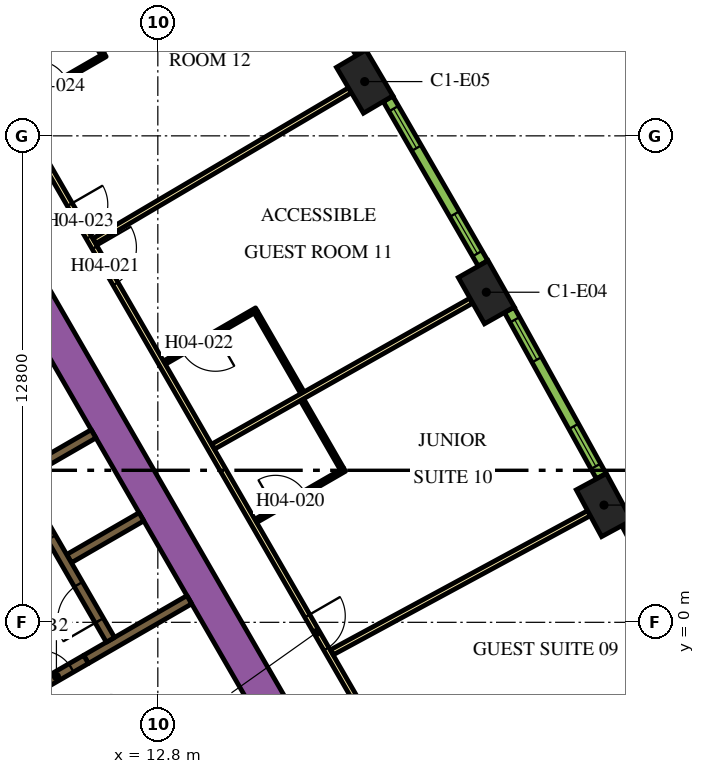
"""IFC4 building model, lengths in metres.
Left out: names, types, materials, properties, quantities, classifications, styles, units other than length and angle.
Written with IfcOpenShell. Run it as: python <this file> out.ifc"""

import sys

from ifc_helpers import new_model, si_unit, direction, frame, frame_2d, origin, origin_2d, place, context, subcontext, project, spatial, rectangle, extrude, element, fill, save


model = new_model("IFC4")
c1 = context("Model", 3, precision=1e-05, world=origin(), true_north=direction((0.0, 1.0)))
c2 = subcontext(c1, "Body", "Model", "MODEL_VIEW")
j1 = project(units=[si_unit("LENGTHUNIT", "METRE"), si_unit("PLANEANGLEUNIT", "RADIAN")], contexts=[c1])
p1 = place(None, origin())
s1 = spatial("IfcSite", under=j1, at=p1, CompositionType="ELEMENT")
p2 = place(p1, origin())
s2 = spatial("IfcBuilding", under=s1, at=p2, CompositionType="ELEMENT")
p3 = place(p2, frame((0.0, 0.0, 62.7)))
s3 = spatial("IfcBuildingStorey", under=s2, at=p3, CompositionType="ELEMENT", Elevation=62.7)
for number, where, z_axis, x_axis in (
    (1, (24.54, 3.085, 0.0), (0.0, 0.0, 1.0), (-0.476, 0.88, 0.0)),
    (2, (21.443, 8.685, 0.0), (0.0, 0.0, 1.0), (-0.492, 0.871, 0.0)),
    (3, (18.243, 14.228, 0.0), (0.0, 0.0, 1.0), (-0.508, 0.861, 0.0)),
):
    element("IfcColumn", number, at=place(p3, frame(where, z_axis=z_axis, x_axis=x_axis)), inside=s3, PredefinedType="COLUMN", context=c2, shape_type="SweptSolid", body=[
        extrude(rectangle(XDim=1.4, YDim=0.9, at=origin_2d()), origin(), (0.0, 0.0, 1.0), 3.9),
    ])
p4 = place(p3, frame((6.776, 13.364, 0.0), z_axis=(0.0, 0.0, 1.0), x_axis=(0.500004177138, -0.8660229921, 0.0)))
e4 = element("IfcWall", 4, at=p4, inside=s3, PredefinedType="SOLIDWALL", context=c2, shape_type="SweptSolid", body=[
    extrude(rectangle(XDim=20.204, YDim=0.9, at=frame_2d((10.102, 0.0))), origin(), (0.0, 0.0, 1.0), 3.9),
])
for number, where, z_axis, x_axis in (
    (5, (10.464, 1.677, 0.0), (0.0, 0.0, 1.0), (0.866, 0.5, 0.0)),
    (6, (9.204, 3.859, 0.0), (0.0, 0.0, 1.0), (0.866, 0.5, 0.0)),
):
    element("IfcWall", number, at=place(p3, frame(where, z_axis=z_axis, x_axis=x_axis)), inside=s3, PredefinedType="SOLIDWALL", context=c2, shape_type="SweptSolid", body=[
        extrude(rectangle(XDim=2.2, YDim=0.25, at=frame_2d((1.1, 0.0))), origin(), (0.0, 0.0, 1.0), 3.9),
    ])
p5 = place(p3, frame((10.911, -0.975, 0.0), z_axis=(0.0, 0.0, 1.0), x_axis=(0.866046979468, 0.499962627957, 0.0)))
e7 = element("IfcWall", 7, at=p5, inside=s3, PredefinedType="SOLIDWALL", context=c2, shape_type="SweptSolid", body=[
    extrude(rectangle(XDim=3.138, YDim=0.25, at=frame_2d((1.569, 0.0))), origin(), (0.0, 0.0, 1.0), 3.9),
])
p6 = place(p3, frame((11.553, -0.46, 0.0), z_axis=(0.0, 0.0, 1.0), x_axis=(-0.500006514828, 0.866021642414, 0.0)))
e8 = element("IfcWall", 8, at=p6, inside=s3, PredefinedType="SOLIDWALL", context=c2, shape_type="SweptSolid", body=[
    extrude(rectangle(XDim=12.35, YDim=0.25, at=frame_2d((6.175, 0.0))), origin(), (0.0, 0.0, 1.0), 3.9),
])
p7 = place(p6, frame((0.585, 0.0, 0.0)))
e9 = element("IfcOpeningElement", 9, at=p7, cuts=e8, PredefinedType="OPENING", context=c2, shape_type="SweptSolid", body=[
    extrude(rectangle(XDim=1.1, YDim=2.1, at=frame_2d((0.55, 1.05))), frame((0.0, 0.135, 0.0), z_axis=(0.0, -1.0, 0.0), x_axis=(1.0, 0.0, 0.0)), (0.0, 0.0, 1.0), 0.27),
])
p8 = place(p6, frame((3.105, 0.0, 0.0)))
e10 = element("IfcOpeningElement", 10, at=p8, cuts=e8, PredefinedType="OPENING", context=c2, shape_type="SweptSolid", body=[
    extrude(rectangle(XDim=1.1, YDim=2.1, at=frame_2d((0.55, 1.05))), frame((0.0, 0.135, 0.0), z_axis=(0.0, -1.0, 0.0), x_axis=(1.0, 0.0, 0.0)), (0.0, 0.0, 1.0), 0.27),
])
p9 = place(p6, frame((5.625, 0.0, 0.0)))
e11 = element("IfcOpeningElement", 11, at=p9, cuts=e8, PredefinedType="OPENING", context=c2, shape_type="SweptSolid", body=[
    extrude(rectangle(XDim=1.1, YDim=2.1, at=frame_2d((0.55, 1.05))), frame((0.0, 0.135, 0.0), z_axis=(0.0, -1.0, 0.0), x_axis=(1.0, 0.0, 0.0)), (0.0, 0.0, 1.0), 0.27),
])
p10 = place(p3, frame((9.352, -1.875, 0.0), z_axis=(0.0, 0.0, 1.0), x_axis=(0.865989075817, 0.500062916607, 0.0)))
e12 = element("IfcWall", 12, at=p10, inside=s3, PredefinedType="SOLIDWALL", context=c2, shape_type="SweptSolid", body=[
    extrude(rectangle(XDim=1.8, YDim=0.25, at=frame_2d((0.9, 0.0))), origin(), (0.0, 0.0, 1.0), 3.9),
])
p11 = place(p10, frame((0.45, 0.0, 0.0)))
e13 = element("IfcOpeningElement", 13, at=p11, cuts=e12, PredefinedType="OPENING", context=c2, shape_type="SweptSolid", body=[
    extrude(rectangle(XDim=0.9, YDim=2.1, at=frame_2d((0.45, 1.05))), frame((0.0, 0.135, 0.0), z_axis=(0.0, -1.0, 0.0), x_axis=(1.0, 0.0, 0.0)), (0.0, 0.0, 1.0), 0.27),
])
p12 = place(p3, frame((6.163, 18.475, 0.0), z_axis=(0.0, 0.0, 1.0), x_axis=(0.500001317485, -0.866024643133, 0.0)))
e14 = element("IfcWall", 14, at=p12, inside=s3, PredefinedType="PARTITIONING", context=c2, shape_type="SweptSolid", body=[
    extrude(rectangle(XDim=25.767, YDim=0.15, at=frame_2d((12.883, 0.0))), origin(), (0.0, 0.0, 1.0), 2.75),
])
p13 = place(p12, frame((21.138, 0.0, 0.0)))
e15 = element("IfcOpeningElement", 15, at=p13, cuts=e14, PredefinedType="OPENING", context=c2, shape_type="SweptSolid", body=[
    extrude(rectangle(XDim=1.0, YDim=2.1, at=frame_2d((0.5, 1.05))), frame((0.0, 0.085, 0.0), z_axis=(0.0, -1.0, 0.0), x_axis=(1.0, 0.0, 0.0)), (0.0, 0.0, 1.0), 0.17),
])
p14 = place(p12, frame((9.948, 0.0, 0.0)))
e16 = element("IfcOpeningElement", 16, at=p14, cuts=e14, PredefinedType="OPENING", context=c2, shape_type="SweptSolid", body=[
    extrude(rectangle(XDim=1.1, YDim=2.1, at=frame_2d((0.55, 1.05))), frame((0.0, 0.085, 0.0), z_axis=(0.0, -1.0, 0.0), x_axis=(1.0, 0.0, 0.0)), (0.0, 0.0, 1.0), 0.17),
])
p15 = place(p12, frame((8.641, 0.0, 0.0)))
e17 = element("IfcOpeningElement", 17, at=p15, cuts=e14, PredefinedType="OPENING", context=c2, shape_type="SweptSolid", body=[
    extrude(rectangle(XDim=1.0, YDim=2.1, at=frame_2d((0.5, 1.05))), frame((0.0, 0.085, 0.0), z_axis=(0.0, -1.0, 0.0), x_axis=(1.0, 0.0, 0.0)), (0.0, 0.0, 1.0), 0.17),
])
p16 = place(p12, frame((0.18, 0.0, 0.0)))
e18 = element("IfcOpeningElement", 18, at=p16, cuts=e14, PredefinedType="OPENING", context=c2, shape_type="SweptSolid", body=[
    extrude(rectangle(XDim=1.0, YDim=2.1, at=frame_2d((0.5, 1.05))), frame((0.0, 0.085, 0.0), z_axis=(0.0, -1.0, 0.0), x_axis=(1.0, 0.0, 0.0)), (0.0, 0.0, 1.0), 0.17),
])
p17 = place(p3, frame((17.856, 13.999, 0.0), z_axis=(0.0, 0.0, 1.0), x_axis=(-0.861371519381, -0.507975497047, 0.0)))
e19 = element("IfcWall", 19, at=p17, inside=s3, PredefinedType="PARTITIONING", context=c2, shape_type="SweptSolid", body=[
    extrude(rectangle(XDim=7.804, YDim=0.15, at=frame_2d((3.902, 0.0))), origin(), (0.0, 0.0, 1.0), 2.75),
])
p18 = place(p3, frame((21.052, 8.464, 0.0), z_axis=(0.0, 0.0, 1.0), x_axis=(-0.87059371954, -0.492002617368, 0.0)))
e20 = element("IfcWall", 20, at=p18, inside=s3, PredefinedType="PARTITIONING", context=c2, shape_type="SweptSolid", body=[
    extrude(rectangle(XDim=7.803, YDim=0.15, at=frame_2d((3.902, 0.0))), origin(), (0.0, 0.0, 1.0), 2.75),
])
p19 = place(p3, frame((24.145, 2.871, 0.0), z_axis=(0.0, 0.0, 1.0), x_axis=(-0.879551725039, -0.475803281809, 0.0)))
e21 = element("IfcWall", 21, at=p19, inside=s3, PredefinedType="PARTITIONING", context=c2, shape_type="SweptSolid", body=[
    extrude(rectangle(XDim=7.688, YDim=0.15, at=frame_2d((3.844, 0.0))), origin(), (0.0, 0.0, 1.0), 2.75),
])
p20 = place(p3, frame((15.376, 2.668, 0.0), z_axis=(0.0, 0.0, 1.0), x_axis=(0.866036505625, 0.499980770555, 0.0)))
e22 = element("IfcWall", 22, at=p20, inside=s3, PredefinedType="PARTITIONING", context=c2, shape_type="SweptSolid", body=[
    extrude(rectangle(XDim=2.7, YDim=0.1, at=frame_2d((1.35, 0.0))), origin(), (0.0, 0.0, 1.0), 2.75),
])
p21 = place(p20, frame((0.6, 0.0, 0.0)))
e23 = element("IfcOpeningElement", 23, at=p21, cuts=e22, PredefinedType="OPENING", context=c2, shape_type="SweptSolid", body=[
    extrude(rectangle(XDim=0.9, YDim=2.1, at=frame_2d((0.45, 1.05))), frame((0.0, 0.06, 0.0), z_axis=(0.0, -1.0, 0.0), x_axis=(1.0, 0.0, 0.0)), (0.0, 0.0, 1.0), 0.12),
])
p22 = place(p3, frame((17.646, 4.036, 0.0), z_axis=(0.0, 0.0, 1.0), x_axis=(-0.500027713859, 0.866009402589, 0.0)))
e24 = element("IfcWall", 24, at=p22, inside=s3, PredefinedType="PARTITIONING", context=c2, shape_type="SweptSolid", body=[
    extrude(rectangle(XDim=2.1, YDim=0.1, at=frame_2d((1.05, 0.0))), origin(), (0.0, 0.0, 1.0), 2.75),
])
p23 = place(p3, frame((15.397, 8.231, 0.0), z_axis=(0.0, 0.0, 1.0), x_axis=(-0.866018616679, -0.500011755427, 0.0)))
e25 = element("IfcWall", 25, at=p23, inside=s3, PredefinedType="PARTITIONING", context=c2, shape_type="SweptSolid", body=[
    extrude(rectangle(XDim=2.8, YDim=0.1, at=frame_2d((1.4, 0.0))), origin(), (0.0, 0.0, 1.0), 2.75),
])
p24 = place(p23, frame((1.25, 0.0, 0.0)))
e26 = element("IfcOpeningElement", 26, at=p24, cuts=e25, PredefinedType="OPENING", context=c2, shape_type="SweptSolid", body=[
    extrude(rectangle(XDim=1.0, YDim=2.1, at=frame_2d((0.5, 1.05))), frame((0.0, 0.06, 0.0), z_axis=(0.0, -1.0, 0.0), x_axis=(1.0, 0.0, 0.0)), (0.0, 0.0, 1.0), 0.12),
])
p25 = place(p3, frame((15.379, 8.163, 0.0), z_axis=(0.0, 0.0, 1.0), x_axis=(0.499987006516, -0.866032905446, 0.0)))
e27 = element("IfcWall", 27, at=p25, inside=s3, PredefinedType="PARTITIONING", context=c2, shape_type="SweptSolid", body=[
    extrude(rectangle(XDim=2.45, YDim=0.1, at=frame_2d((1.225, 0.0))), origin(), (0.0, 0.0, 1.0), 2.75),
])
p26 = place(p3, frame((9.077, 13.578, 0.0), z_axis=(0.0, 0.0, 1.0), x_axis=(0.866036505625, 0.499980770555, 0.0)))
e28 = element("IfcWall", 28, at=p26, inside=s3, PredefinedType="PARTITIONING", context=c2, shape_type="SweptSolid", body=[
    extrude(rectangle(XDim=2.7, YDim=0.1, at=frame_2d((1.35, 0.0))), origin(), (0.0, 0.0, 1.0), 2.75),
])
p27 = place(p26, frame((0.6, 0.0, 0.0)))
e29 = element("IfcOpeningElement", 29, at=p27, cuts=e28, PredefinedType="OPENING", context=c2, shape_type="SweptSolid", body=[
    extrude(rectangle(XDim=0.9, YDim=2.1, at=frame_2d((0.45, 1.05))), frame((0.0, 0.06, 0.0), z_axis=(0.0, -1.0, 0.0), x_axis=(1.0, 0.0, 0.0)), (0.0, 0.0, 1.0), 0.12),
])
p28 = place(p3, frame((11.342, 14.955, 0.0), z_axis=(0.0, 0.0, 1.0), x_axis=(-0.500008976872, 0.866020220923, 0.0)))
e30 = element("IfcWall", 30, at=p28, inside=s3, PredefinedType="PARTITIONING", context=c2, shape_type="SweptSolid", body=[
    extrude(rectangle(XDim=2.09, YDim=0.1, at=frame_2d((1.045, 0.0))), origin(), (0.0, 0.0, 1.0), 2.75),
])
p29 = place(p3, frame((27.475, -1.81, 0.0), z_axis=(0.0, 0.0, 1.0), x_axis=(-0.467629620899, 0.883924509026, 0.0)))
e31 = element("IfcWall", 31, at=p29, inside=s3, PredefinedType="SOLIDWALL", context=c2, shape_type="SweptSolid", body=[
    extrude(rectangle(XDim=4.998, YDim=0.29, at=frame_2d((2.499, 0.0))), origin(), (0.0, 0.0, 1.0), 3.65),
])
p30 = place(p29, frame((0.297, 0.0, 0.9)))
e32 = element("IfcOpeningElement", 32, at=p30, cuts=e31, PredefinedType="OPENING", context=c2, shape_type="SweptSolid", body=[
    extrude(rectangle(XDim=1.2, YDim=2.15, at=frame_2d((0.6, 1.075))), frame((0.0, 0.155, 0.0), z_axis=(0.0, -1.0, 0.0), x_axis=(1.0, 0.0, 0.0)), (0.0, 0.0, 1.0), 0.31),
])
p31 = place(p29, frame((3.501, 0.0, 0.9)))
e33 = element("IfcOpeningElement", 33, at=p31, cuts=e31, PredefinedType="OPENING", context=c2, shape_type="SweptSolid", body=[
    extrude(rectangle(XDim=1.2, YDim=2.15, at=frame_2d((0.6, 1.075))), frame((0.0, 0.155, 0.0), z_axis=(0.0, -1.0, 0.0), x_axis=(1.0, 0.0, 0.0)), (0.0, 0.0, 1.0), 0.31),
])
p32 = place(p3, frame((24.468, 3.846, 0.0), z_axis=(0.0, 0.0, 1.0), x_axis=(-0.483912572871, 0.875116347589, 0.0)))
e34 = element("IfcWall", 34, at=p32, inside=s3, PredefinedType="SOLIDWALL", context=c2, shape_type="SweptSolid", body=[
    extrude(rectangle(XDim=4.998, YDim=0.29, at=frame_2d((2.499, 0.0))), origin(), (0.0, 0.0, 1.0), 3.65),
])
p33 = place(p32, frame((0.297, 0.0, 0.9)))
e35 = element("IfcOpeningElement", 35, at=p33, cuts=e34, PredefinedType="OPENING", context=c2, shape_type="SweptSolid", body=[
    extrude(rectangle(XDim=1.2, YDim=2.15, at=frame_2d((0.6, 1.075))), frame((0.0, 0.155, 0.0), z_axis=(0.0, -1.0, 0.0), x_axis=(1.0, 0.0, 0.0)), (0.0, 0.0, 1.0), 0.31),
])
p34 = place(p32, frame((3.501, 0.0, 0.9)))
e36 = element("IfcOpeningElement", 36, at=p34, cuts=e34, PredefinedType="OPENING", context=c2, shape_type="SweptSolid", body=[
    extrude(rectangle(XDim=1.2, YDim=2.15, at=frame_2d((0.6, 1.075))), frame((0.0, 0.155, 0.0), z_axis=(0.0, -1.0, 0.0), x_axis=(1.0, 0.0, 0.0)), (0.0, 0.0, 1.0), 0.31),
])
p35 = place(p3, frame((21.357, 9.445, 0.0), z_axis=(0.0, 0.0, 1.0), x_axis=(-0.50002123722, 0.866013142123, 0.0)))
e37 = element("IfcWall", 37, at=p35, inside=s3, PredefinedType="SOLIDWALL", context=c2, shape_type="SweptSolid", body=[
    extrude(rectangle(XDim=4.998, YDim=0.29, at=frame_2d((2.499, 0.0))), origin(), (0.0, 0.0, 1.0), 3.65),
])
p36 = place(p35, frame((0.297, 0.0, 0.9)))
e38 = element("IfcOpeningElement", 38, at=p36, cuts=e37, PredefinedType="OPENING", context=c2, shape_type="SweptSolid", body=[
    extrude(rectangle(XDim=1.2, YDim=2.15, at=frame_2d((0.6, 1.075))), frame((0.0, 0.155, 0.0), z_axis=(0.0, -1.0, 0.0), x_axis=(1.0, 0.0, 0.0)), (0.0, 0.0, 1.0), 0.31),
])
p37 = place(p35, frame((3.501, 0.0, 0.9)))
e39 = element("IfcOpeningElement", 39, at=p37, cuts=e37, PredefinedType="OPENING", context=c2, shape_type="SweptSolid", body=[
    extrude(rectangle(XDim=1.2, YDim=2.15, at=frame_2d((0.6, 1.075))), frame((0.0, 0.155, 0.0), z_axis=(0.0, -1.0, 0.0), x_axis=(1.0, 0.0, 0.0)), (0.0, 0.0, 1.0), 0.31),
])
p38 = place(p3, frame((18.143, 14.986, 0.0), z_axis=(0.0, 0.0, 1.0), x_axis=(-0.515938796285, 0.856625448191, 0.0)))
e40 = element("IfcWall", 40, at=p38, inside=s3, PredefinedType="SOLIDWALL", context=c2, shape_type="SweptSolid", body=[
    extrude(rectangle(XDim=4.998, YDim=0.29, at=frame_2d((2.499, 0.0))), origin(), (0.0, 0.0, 1.0), 3.65),
])
p39 = place(p38, frame((0.297, 0.0, 0.9)))
e41 = element("IfcOpeningElement", 41, at=p39, cuts=e40, PredefinedType="OPENING", context=c2, shape_type="SweptSolid", body=[
    extrude(rectangle(XDim=1.2, YDim=2.15, at=frame_2d((0.6, 1.075))), frame((0.0, 0.155, 0.0), z_axis=(0.0, -1.0, 0.0), x_axis=(1.0, 0.0, 0.0)), (0.0, 0.0, 1.0), 0.31),
])
p40 = place(p38, frame((3.501, 0.0, 0.9)))
e42 = element("IfcOpeningElement", 42, at=p40, cuts=e40, PredefinedType="OPENING", context=c2, shape_type="SweptSolid", body=[
    extrude(rectangle(XDim=1.2, YDim=2.15, at=frame_2d((0.6, 1.075))), frame((0.0, 0.155, 0.0), z_axis=(0.0, -1.0, 0.0), x_axis=(1.0, 0.0, 0.0)), (0.0, 0.0, 1.0), 0.31),
])
p41 = place(p7, origin())
e43 = element("IfcDoor", 43, at=p41, inside=s3, OperationType="DOUBLE_DOOR_SLIDING", PredefinedType="DOOR", context=c2, shape_type="SweptSolid", body=[
    extrude(rectangle(XDim=1.1, YDim=2.1, at=frame_2d((0.55, 1.05))), frame((0.0, 0.025, 0.0), z_axis=(0.0, -1.0, 0.0), x_axis=(1.0, 0.0, 0.0)), (0.0, 0.0, 1.0), 0.05),
])
fill(e9, e43)
p42 = place(p8, origin())
e44 = element("IfcDoor", 44, at=p42, inside=s3, OperationType="DOUBLE_DOOR_SLIDING", PredefinedType="DOOR", context=c2, shape_type="SweptSolid", body=[
    extrude(rectangle(XDim=1.1, YDim=2.1, at=frame_2d((0.55, 1.05))), frame((0.0, 0.025, 0.0), z_axis=(0.0, -1.0, 0.0), x_axis=(1.0, 0.0, 0.0)), (0.0, 0.0, 1.0), 0.05),
])
fill(e10, e44)
p43 = place(p11, origin())
e45 = element("IfcDoor", 45, at=p43, inside=s3, OperationType="SINGLE_SWING_LEFT", PredefinedType="DOOR", context=c2, shape_type="SweptSolid", body=[
    extrude(rectangle(XDim=0.9, YDim=2.1, at=frame_2d((0.45, 1.05))), frame((0.0, 0.025, 0.0), z_axis=(0.0, -1.0, 0.0), x_axis=(1.0, 0.0, 0.0)), (0.0, 0.0, 1.0), 0.05),
])
fill(e13, e45)
p44 = place(p13, origin())
e46 = element("IfcDoor", 46, at=p44, inside=s3, OperationType="SINGLE_SWING_RIGHT", PredefinedType="DOOR", context=c2, shape_type="SweptSolid", body=[
    extrude(rectangle(XDim=1.0, YDim=2.1, at=frame_2d((0.5, 1.05))), frame((0.0, 0.025, 0.0), z_axis=(0.0, -1.0, 0.0), x_axis=(1.0, 0.0, 0.0)), (0.0, 0.0, 1.0), 0.05),
])
fill(e15, e46)
p45 = place(p21, origin())
e47 = element("IfcDoor", 47, at=p45, inside=s3, OperationType="SINGLE_SWING_LEFT", PredefinedType="DOOR", context=c2, shape_type="SweptSolid", body=[
    extrude(rectangle(XDim=0.9, YDim=2.1, at=frame_2d((0.45, 1.05))), frame((0.0, 0.025, 0.0), z_axis=(0.0, -1.0, 0.0), x_axis=(1.0, 0.0, 0.0)), (0.0, 0.0, 1.0), 0.05),
])
fill(e23, e47)
p46 = place(p14, origin())
e48 = element("IfcDoor", 48, at=p46, inside=s3, OperationType="SINGLE_SWING_LEFT", PredefinedType="DOOR", context=c2, shape_type="SweptSolid", body=[
    extrude(rectangle(XDim=1.1, YDim=2.1, at=frame_2d((0.55, 1.05))), frame((0.0, 0.025, 0.0), z_axis=(0.0, -1.0, 0.0), x_axis=(1.0, 0.0, 0.0)), (0.0, 0.0, 1.0), 0.05),
])
fill(e16, e48)
p47 = place(p24, origin())
e49 = element("IfcDoor", 49, at=p47, inside=s3, OperationType="SINGLE_SWING_LEFT", PredefinedType="DOOR", context=c2, shape_type="SweptSolid", body=[
    extrude(rectangle(XDim=1.0, YDim=2.1, at=frame_2d((0.5, 1.05))), frame((0.0, 0.025, 0.0), z_axis=(0.0, -1.0, 0.0), x_axis=(1.0, 0.0, 0.0)), (0.0, 0.0, 1.0), 0.05),
])
fill(e26, e49)
p48 = place(p15, origin())
e50 = element("IfcDoor", 50, at=p48, inside=s3, OperationType="SINGLE_SWING_RIGHT", PredefinedType="DOOR", context=c2, shape_type="SweptSolid", body=[
    extrude(rectangle(XDim=1.0, YDim=2.1, at=frame_2d((0.5, 1.05))), frame((0.0, 0.025, 0.0), z_axis=(0.0, -1.0, 0.0), x_axis=(1.0, 0.0, 0.0)), (0.0, 0.0, 1.0), 0.05),
])
fill(e17, e50)
p49 = place(p27, origin())
e51 = element("IfcDoor", 51, at=p49, inside=s3, OperationType="SINGLE_SWING_RIGHT", PredefinedType="DOOR", context=c2, shape_type="SweptSolid", body=[
    extrude(rectangle(XDim=0.9, YDim=2.1, at=frame_2d((0.45, 1.05))), frame((0.0, 0.025, 0.0), z_axis=(0.0, -1.0, 0.0), x_axis=(1.0, 0.0, 0.0)), (0.0, 0.0, 1.0), 0.05),
])
fill(e29, e51)
p50 = place(p33, origin())
e52 = element("IfcWindow", 52, at=p50, inside=s3, PartitioningType="DOUBLE_PANEL_VERTICAL", PredefinedType="WINDOW", context=c2, shape_type="SweptSolid", body=[
    extrude(rectangle(XDim=1.2, YDim=2.15, at=frame_2d((0.6, 1.075))), frame((0.0, 0.015, 0.0), z_axis=(0.0, -1.0, 0.0), x_axis=(1.0, 0.0, 0.0)), (0.0, 0.0, 1.0), 0.06),
])
fill(e35, e52)
p51 = place(p34, origin())
e53 = element("IfcWindow", 53, at=p51, inside=s3, PartitioningType="DOUBLE_PANEL_VERTICAL", PredefinedType="WINDOW", context=c2, shape_type="SweptSolid", body=[
    extrude(rectangle(XDim=1.2, YDim=2.15, at=frame_2d((0.6, 1.075))), frame((0.0, 0.015, 0.0), z_axis=(0.0, -1.0, 0.0), x_axis=(1.0, 0.0, 0.0)), (0.0, 0.0, 1.0), 0.06),
])
fill(e36, e53)
p52 = place(p36, origin())
e54 = element("IfcWindow", 54, at=p52, inside=s3, PartitioningType="DOUBLE_PANEL_VERTICAL", PredefinedType="WINDOW", context=c2, shape_type="SweptSolid", body=[
    extrude(rectangle(XDim=1.2, YDim=2.15, at=frame_2d((0.6, 1.075))), frame((0.0, 0.015, 0.0), z_axis=(0.0, -1.0, 0.0), x_axis=(1.0, 0.0, 0.0)), (0.0, 0.0, 1.0), 0.06),
])
fill(e38, e54)
p53 = place(p37, origin())
e55 = element("IfcWindow", 55, at=p53, inside=s3, PartitioningType="DOUBLE_PANEL_VERTICAL", PredefinedType="WINDOW", context=c2, shape_type="SweptSolid", body=[
    extrude(rectangle(XDim=1.2, YDim=2.15, at=frame_2d((0.6, 1.075))), frame((0.0, 0.015, 0.0), z_axis=(0.0, -1.0, 0.0), x_axis=(1.0, 0.0, 0.0)), (0.0, 0.0, 1.0), 0.06),
])
fill(e39, e55)
save(model, sys.argv[1])
